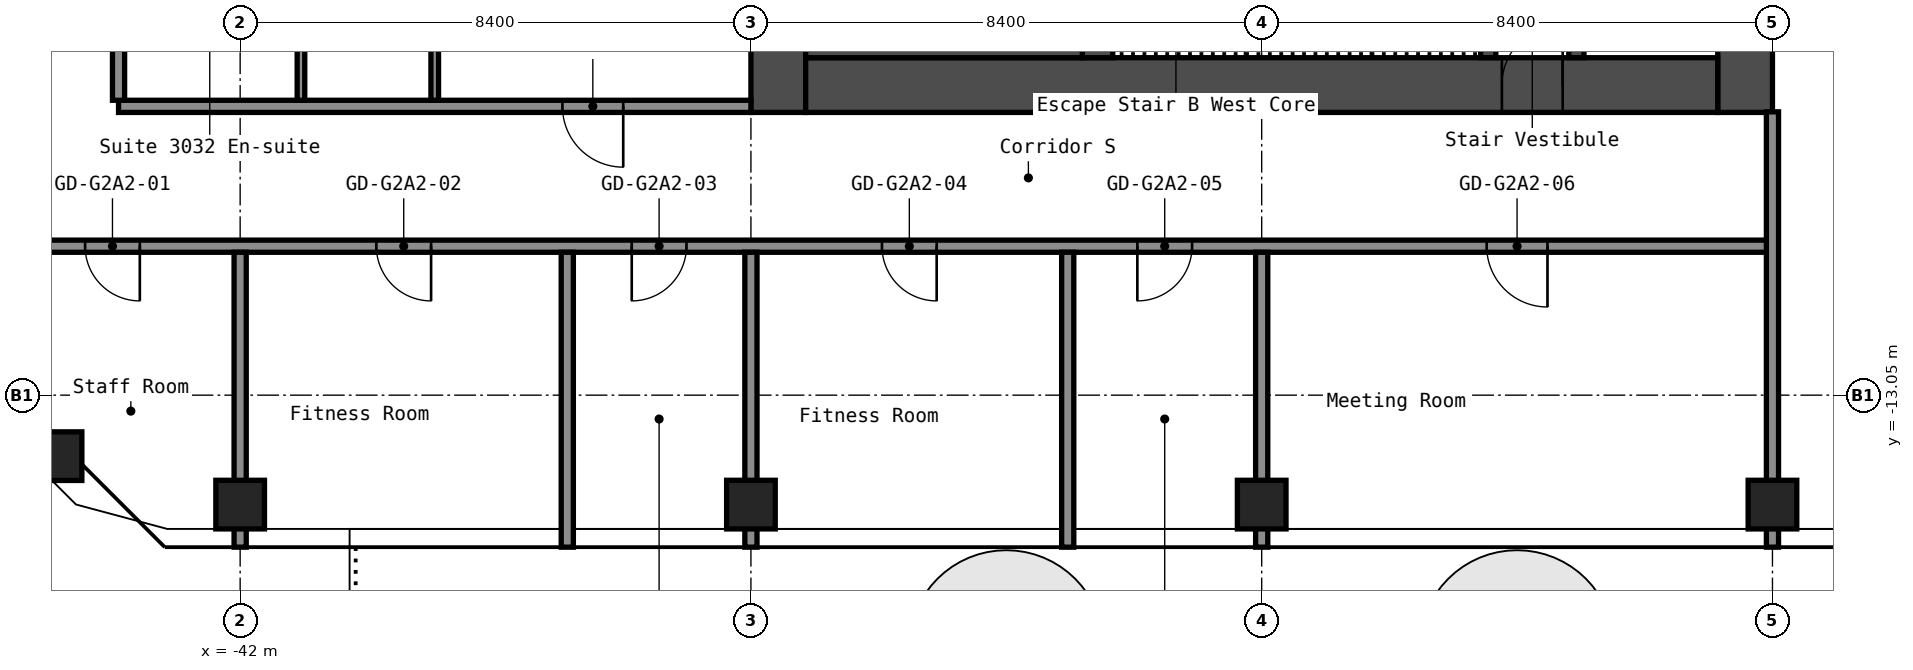
"""IFC4 building model, lengths in metres.
Left out: names, types, materials, properties, quantities, classifications, styles, units other than length and angle.
Written with IfcOpenShell. Run it as: python <this file> out.ifc"""

import sys

from ifc_helpers import new_model, si_unit, direction, frame, frame_2d, origin, origin_2d, place, context, subcontext, project, spatial, rectangle, hollow_rectangle, extrude, element, fill, save


model = new_model("IFC4")
c1 = context("Model", 3, precision=1e-05, world=origin(), true_north=direction((0.0, 1.0)))
c2 = subcontext(c1, "Body", "Model", "MODEL_VIEW")
j1 = project(units=[si_unit("LENGTHUNIT", "METRE"), si_unit("PLANEANGLEUNIT", "RADIAN")], contexts=[c1])
p1 = place(None, origin())
s1 = spatial("IfcSite", under=j1, at=p1, CompositionType="ELEMENT")
p2 = place(p1, origin())
s2 = spatial("IfcBuilding", under=s1, at=p2, CompositionType="ELEMENT")
p3 = place(p2, frame((0.0, 0.0, 107.4)))
s3 = spatial("IfcBuildingStorey", under=s2, at=p3, CompositionType="ELEMENT", Elevation=107.4)
for number, where, z_axis, x_axis in (
    (1, (-45.003, -14.053, 0.0), (0.0, 0.0, 1.0), (1.0, 0.0, 0.0)),
    (2, (-42.0, -14.85, 0.0), (0.0, 0.0, 1.0), (1.0, 0.0, 0.0)),
    (3, (-33.6, -14.85, 0.0), (0.0, 0.0, 1.0), (1.0, 0.0, 0.0)),
    (4, (-25.2, -14.85, 0.0), (0.0, 0.0, 1.0), (1.0, 0.0, 0.0)),
    (5, (-16.8, -14.85, 0.0), (0.0, 0.0, 1.0), (1.0, 0.0, 0.0)),
):
    element("IfcColumn", number, at=place(p3, frame(where, z_axis=z_axis, x_axis=x_axis)), inside=s3, PredefinedType="COLUMN", context=c2, shape_type="SweptSolid", body=[
        extrude(hollow_rectangle(XDim=0.8, YDim=0.8, WallThickness=0.032, at=origin_2d()), origin(), (0.0, 0.0, 1.0), 2.8),
    ])
p4 = place(p3, frame((-17.25, -8.4, 0.0), z_axis=(0.0, 0.0, 1.0), x_axis=(0.0, 1.0, 0.0)))
e6 = element("IfcWall", 6, at=p4, inside=s3, PredefinedType="SHEAR", context=c2, shape_type="SweptSolid", body=[
    extrude(rectangle(XDim=16.8, YDim=0.9, at=frame_2d((8.4, 0.0))), origin(), (0.0, 0.0, 1.0), 2.8),
])
p5 = place(p4, frame((7.6, 0.0, 0.0)))
e7 = element("IfcOpeningElement", 7, at=p5, cuts=e6, PredefinedType="OPENING", context=c2, shape_type="SweptSolid", body=[
    extrude(rectangle(XDim=1.2, YDim=2.1, at=frame_2d((0.6, 1.05))), frame((0.0, 0.46, 0.0), z_axis=(0.0, -1.0, 0.0), x_axis=(1.0, 0.0, 0.0)), (0.0, 0.0, 1.0), 0.92),
])
p6 = place(p3, frame((-33.15, -8.4, 0.0), z_axis=(0.0, 0.0, 1.0), x_axis=(0.0, 1.0, 0.0)))
e8 = element("IfcWall", 8, at=p6, inside=s3, PredefinedType="SHEAR", context=c2, shape_type="SweptSolid", body=[
    extrude(rectangle(XDim=16.8, YDim=0.9, at=frame_2d((8.4, 0.0))), origin(), (0.0, 0.0, 1.0), 2.8),
])
p7 = place(p3, frame((-32.7, -7.95, 0.0), z_axis=(0.0, 0.0, 1.0), x_axis=(1.0, 0.0, 0.0)))
e9 = element("IfcWall", 9, at=p7, inside=s3, PredefinedType="SHEAR", context=c2, shape_type="SweptSolid", body=[
    extrude(rectangle(XDim=15.0, YDim=0.9, at=frame_2d((7.5, 0.0))), origin(), (0.0, 0.0, 1.0), 2.8),
])
p8 = place(p7, frame((11.45, 0.0, 0.0)))
e10 = element("IfcOpeningElement", 10, at=p8, cuts=e9, PredefinedType="OPENING", context=c2, shape_type="SweptSolid", body=[
    extrude(rectangle(XDim=1.0, YDim=2.1, at=frame_2d((0.5, 1.05))), frame((0.0, 0.46, 0.0), z_axis=(0.0, -1.0, 0.0), x_axis=(1.0, 0.0, 0.0)), (0.0, 0.0, 1.0), 0.92),
])
p9 = place(p3, frame((-20.025, -7.5, 0.0), z_axis=(0.0, 0.0, 1.0), x_axis=(0.0, 1.0, 0.0)))
e11 = element("IfcWall", 11, at=p9, inside=s3, PredefinedType="SHEAR", context=c2, shape_type="SweptSolid", body=[
    extrude(rectangle(XDim=6.3, YDim=0.25, at=frame_2d((3.15, 0.0))), origin(), (0.0, 0.0, 1.0), 2.8),
])
p10 = place(p9, frame((2.4, 0.0, 0.0)))
e12 = element("IfcOpeningElement", 12, at=p10, cuts=e11, PredefinedType="OPENING", context=c2, shape_type="SweptSolid", body=[
    extrude(rectangle(XDim=1.0, YDim=2.1, at=frame_2d((0.5, 1.05))), frame((0.0, 0.135, 0.0), z_axis=(0.0, -1.0, 0.0), x_axis=(1.0, 0.0, 0.0)), (0.0, 0.0, 1.0), 0.27),
])
p11 = place(p3, frame((-21.475, -7.5, 0.0), z_axis=(0.0, 0.0, 1.0), x_axis=(0.0, 1.0, 0.0)))
e13 = element("IfcWall", 13, at=p11, inside=s3, PredefinedType="SHEAR", context=c2, shape_type="SweptSolid", body=[
    extrude(rectangle(XDim=3.75, YDim=0.25, at=frame_2d((1.875, 0.0))), origin(), (0.0, 0.0, 1.0), 2.8),
])
p12 = place(p11, frame((1.3, 0.0, 0.0)))
e14 = element("IfcOpeningElement", 14, at=p12, cuts=e13, PredefinedType="OPENING", context=c2, shape_type="SweptSolid", body=[
    extrude(rectangle(XDim=1.2, YDim=2.1, at=frame_2d((0.6, 1.05))), frame((0.0, 0.135, 0.0), z_axis=(0.0, -1.0, 0.0), x_axis=(1.0, 0.0, 0.0)), (0.0, 0.0, 1.0), 0.27),
])
p13 = place(p3, frame((-27.9, -7.5, 0.0), z_axis=(0.0, 0.0, 1.0), x_axis=(0.0, 1.0, 0.0)))
e15 = element("IfcWall", 15, at=p13, inside=s3, PredefinedType="SHEAR", context=c2, shape_type="SweptSolid", body=[
    extrude(rectangle(XDim=3.75, YDim=0.5, at=frame_2d((1.875, 0.0))), origin(), (0.0, 0.0, 1.0), 2.8),
])
p14 = place(p3, frame((-32.7, -6.75, 0.0), z_axis=(0.0, 0.0, 1.0), x_axis=(1.0, 0.0, 0.0)))
e16 = element("IfcWall", 16, at=p14, inside=s3, PredefinedType="SHEAR", context=c2, shape_type="SweptSolid", body=[
    extrude(rectangle(XDim=4.55, YDim=1.5, at=frame_2d((2.275, 0.0))), origin(), (0.0, 0.0, 1.0), 2.8),
])
p15 = place(p3, frame((-46.5, -10.6, 0.0), z_axis=(0.0, 0.0, 1.0), x_axis=(1.0, 0.0, 0.0)))
e17 = element("IfcWall", 17, at=p15, inside=s3, PredefinedType="PARTITIONING", context=c2, shape_type="SweptSolid", body=[
    extrude(rectangle(XDim=29.7, YDim=0.2, at=frame_2d((14.85, 0.0))), origin(), (0.0, 0.0, 1.0), 2.8),
])
p16 = place(p15, frame((1.95, 0.0, 0.0)))
e18 = element("IfcOpeningElement", 18, at=p16, cuts=e17, PredefinedType="OPENING", context=c2, shape_type="SweptSolid", body=[
    extrude(rectangle(XDim=0.9, YDim=2.1, at=frame_2d((0.45, 1.05))), frame((0.0, 0.11, 0.0), z_axis=(0.0, -1.0, 0.0), x_axis=(1.0, 0.0, 0.0)), (0.0, 0.0, 1.0), 0.22),
])
p17 = place(p15, frame((6.74, 0.0, 0.0)))
e19 = element("IfcOpeningElement", 19, at=p17, cuts=e17, PredefinedType="OPENING", context=c2, shape_type="SweptSolid", body=[
    extrude(rectangle(XDim=0.9, YDim=2.1, at=frame_2d((0.45, 1.05))), frame((0.0, 0.11, 0.0), z_axis=(0.0, -1.0, 0.0), x_axis=(1.0, 0.0, 0.0)), (0.0, 0.0, 1.0), 0.22),
])
p18 = place(p15, frame((10.94, 0.0, 0.0)))
e20 = element("IfcOpeningElement", 20, at=p18, cuts=e17, PredefinedType="OPENING", context=c2, shape_type="SweptSolid", body=[
    extrude(rectangle(XDim=0.9, YDim=2.1, at=frame_2d((0.45, 1.05))), frame((0.0, 0.11, 0.0), z_axis=(0.0, -1.0, 0.0), x_axis=(1.0, 0.0, 0.0)), (0.0, 0.0, 1.0), 0.22),
])
p19 = place(p15, frame((15.055, 0.0, 0.0)))
e21 = element("IfcOpeningElement", 21, at=p19, cuts=e17, PredefinedType="OPENING", context=c2, shape_type="SweptSolid", body=[
    extrude(rectangle(XDim=0.9, YDim=2.1, at=frame_2d((0.45, 1.05))), frame((0.0, 0.11, 0.0), z_axis=(0.0, -1.0, 0.0), x_axis=(1.0, 0.0, 0.0)), (0.0, 0.0, 1.0), 0.22),
])
p20 = place(p15, frame((19.255, 0.0, 0.0)))
e22 = element("IfcOpeningElement", 22, at=p20, cuts=e17, PredefinedType="OPENING", context=c2, shape_type="SweptSolid", body=[
    extrude(rectangle(XDim=0.9, YDim=2.1, at=frame_2d((0.45, 1.05))), frame((0.0, 0.11, 0.0), z_axis=(0.0, -1.0, 0.0), x_axis=(1.0, 0.0, 0.0)), (0.0, 0.0, 1.0), 0.22),
])
p21 = place(p15, frame((25.0, 0.0, 0.0)))
e23 = element("IfcOpeningElement", 23, at=p21, cuts=e17, PredefinedType="OPENING", context=c2, shape_type="SweptSolid", body=[
    extrude(rectangle(XDim=1.0, YDim=2.1, at=frame_2d((0.5, 1.05))), frame((0.0, 0.11, 0.0), z_axis=(0.0, -1.0, 0.0), x_axis=(1.0, 0.0, 0.0)), (0.0, 0.0, 1.0), 0.22),
])
p22 = place(p3, frame((-44.0, -8.3, 0.0), z_axis=(0.0, 0.0, 1.0), x_axis=(1.0, 0.0, 0.0)))
e24 = element("IfcWall", 24, at=p22, inside=s3, PredefinedType="PARTITIONING", context=c2, shape_type="SweptSolid", body=[
    extrude(rectangle(XDim=10.4, YDim=0.2, at=frame_2d((5.2, 0.0))), origin(), (0.0, 0.0, 1.0), 2.8),
])
p23 = place(p22, frame((7.3, 0.0, 0.0)))
e25 = element("IfcOpeningElement", 25, at=p23, cuts=e24, PredefinedType="OPENING", context=c2, shape_type="SweptSolid", body=[
    extrude(rectangle(XDim=1.0, YDim=2.1, at=frame_2d((0.5, 1.05))), frame((0.0, 0.11, 0.0), z_axis=(0.0, -1.0, 0.0), x_axis=(1.0, 0.0, 0.0)), (0.0, 0.0, 1.0), 0.22),
])
p24 = place(p3, frame((-44.0, -8.2, 0.0), z_axis=(0.0, 0.0, 1.0), x_axis=(0.0, 1.0, 0.0)))
e26 = element("IfcWall", 26, at=p24, inside=s3, PredefinedType="PARTITIONING", context=c2, shape_type="SweptSolid", body=[
    extrude(rectangle(XDim=16.4, YDim=0.2, at=frame_2d((8.2, 0.0))), origin(), (0.0, 0.0, 1.0), 2.8),
])
p25 = place(p3, frame((-42.0, -15.55, 0.0), z_axis=(0.0, 0.0, 1.0), x_axis=(0.0, 1.0, 0.0)))
e27 = element("IfcWall", 27, at=p25, inside=s3, PredefinedType="PARTITIONING", context=c2, shape_type="SweptSolid", body=[
    extrude(rectangle(XDim=4.85, YDim=0.2, at=frame_2d((2.425, 0.0))), origin(), (0.0, 0.0, 1.0), 2.8),
])
p26 = place(p3, frame((-41.0, -8.2, 0.0), z_axis=(0.0, 0.0, 1.0), x_axis=(0.0, 1.0, 0.0)))
e28 = element("IfcWall", 28, at=p26, inside=s3, PredefinedType="PARTITIONING", context=c2, shape_type="SweptSolid", body=[
    extrude(rectangle(XDim=3.1, YDim=0.125, at=frame_2d((1.55, 0.0))), origin(), (0.0, 0.0, 1.0), 2.8),
])
p27 = place(p3, frame((-38.8, -8.2, 0.0), z_axis=(0.0, 0.0, 1.0), x_axis=(0.0, 1.0, 0.0)))
e29 = element("IfcWall", 29, at=p27, inside=s3, PredefinedType="PARTITIONING", context=c2, shape_type="SweptSolid", body=[
    extrude(rectangle(XDim=8.1, YDim=0.125, at=frame_2d((4.05, 0.0))), origin(), (0.0, 0.0, 1.0), 2.8),
])
p28 = place(p27, frame((4.05, 0.0, 0.0)))
e30 = element("IfcOpeningElement", 30, at=p28, cuts=e29, PredefinedType="OPENING", context=c2, shape_type="SweptSolid", body=[
    extrude(rectangle(XDim=0.9, YDim=2.1, at=frame_2d((0.45, 1.05))), frame((0.0, 0.073, 0.0), z_axis=(0.0, -1.0, 0.0), x_axis=(1.0, 0.0, 0.0)), (0.0, 0.0, 1.0), 0.145),
])
for number, where, z_axis, x_axis in (
    (31, (-36.62, -15.55, 0.0), (0.0, 0.0, 1.0), (0.0, 1.0, 0.0)),
    (32, (-33.6, -15.55, 0.0), (0.0, 0.0, 1.0), (0.0, 1.0, 0.0)),
    (33, (-28.39, -15.55, 0.0), (0.0, 0.0, 1.0), (0.0, 1.0, 0.0)),
    (34, (-25.2, -15.55, 0.0), (0.0, 0.0, 1.0), (0.0, 1.0, 0.0)),
):
    element("IfcWall", number, at=place(p3, frame(where, z_axis=z_axis, x_axis=x_axis)), inside=s3, PredefinedType="PARTITIONING", context=c2, shape_type="SweptSolid", body=[
        extrude(rectangle(XDim=4.85, YDim=0.2, at=frame_2d((2.425, 0.0))), origin(), (0.0, 0.0, 1.0), 2.8),
    ])
p29 = place(p3, frame((-16.8, -15.55, 0.0), z_axis=(0.0, 0.0, 1.0), x_axis=(0.0, 1.0, 0.0)))
e35 = element("IfcWall", 35, at=p29, inside=s3, PredefinedType="PARTITIONING", context=c2, shape_type="SweptSolid", body=[
    extrude(rectangle(XDim=7.16, YDim=0.2, at=frame_2d((3.58, 0.0))), origin(), (0.0, 0.0, 1.0), 2.8),
])
p30 = place(p8, origin())
e36 = element("IfcDoor", 36, at=p30, inside=s3, OperationType="SINGLE_SWING_LEFT", PredefinedType="DOOR", context=c2, shape_type="SweptSolid", body=[
    extrude(rectangle(XDim=1.0, YDim=2.1, at=frame_2d((0.5, 1.05))), frame((0.0, 0.025, 0.0), z_axis=(0.0, -1.0, 0.0), x_axis=(1.0, 0.0, 0.0)), (0.0, 0.0, 1.0), 0.05),
])
fill(e10, e36)
p31 = place(p16, origin())
e37 = element("IfcDoor", 37, at=p31, inside=s3, OperationType="SINGLE_SWING_RIGHT", PredefinedType="DOOR", context=c2, shape_type="SweptSolid", body=[
    extrude(rectangle(XDim=0.9, YDim=2.1, at=frame_2d((0.45, 1.05))), frame((0.0, 0.025, 0.0), z_axis=(0.0, -1.0, 0.0), x_axis=(1.0, 0.0, 0.0)), (0.0, 0.0, 1.0), 0.05),
])
fill(e18, e37)
p32 = place(p17, origin())
e38 = element("IfcDoor", 38, at=p32, inside=s3, OperationType="SINGLE_SWING_RIGHT", PredefinedType="DOOR", context=c2, shape_type="SweptSolid", body=[
    extrude(rectangle(XDim=0.9, YDim=2.1, at=frame_2d((0.45, 1.05))), frame((0.0, 0.025, 0.0), z_axis=(0.0, -1.0, 0.0), x_axis=(1.0, 0.0, 0.0)), (0.0, 0.0, 1.0), 0.05),
])
fill(e19, e38)
p33 = place(p18, origin())
e39 = element("IfcDoor", 39, at=p33, inside=s3, OperationType="SINGLE_SWING_LEFT", PredefinedType="DOOR", context=c2, shape_type="SweptSolid", body=[
    extrude(rectangle(XDim=0.9, YDim=2.1, at=frame_2d((0.45, 1.05))), frame((0.0, 0.025, 0.0), z_axis=(0.0, -1.0, 0.0), x_axis=(1.0, 0.0, 0.0)), (0.0, 0.0, 1.0), 0.05),
])
fill(e20, e39)
p34 = place(p19, origin())
e40 = element("IfcDoor", 40, at=p34, inside=s3, OperationType="SINGLE_SWING_RIGHT", PredefinedType="DOOR", context=c2, shape_type="SweptSolid", body=[
    extrude(rectangle(XDim=0.9, YDim=2.1, at=frame_2d((0.45, 1.05))), frame((0.0, 0.025, 0.0), z_axis=(0.0, -1.0, 0.0), x_axis=(1.0, 0.0, 0.0)), (0.0, 0.0, 1.0), 0.05),
])
fill(e21, e40)
p35 = place(p20, origin())
e41 = element("IfcDoor", 41, at=p35, inside=s3, OperationType="SINGLE_SWING_LEFT", PredefinedType="DOOR", context=c2, shape_type="SweptSolid", body=[
    extrude(rectangle(XDim=0.9, YDim=2.1, at=frame_2d((0.45, 1.05))), frame((0.0, 0.025, 0.0), z_axis=(0.0, -1.0, 0.0), x_axis=(1.0, 0.0, 0.0)), (0.0, 0.0, 1.0), 0.05),
])
fill(e22, e41)
p36 = place(p21, origin())
e42 = element("IfcDoor", 42, at=p36, inside=s3, OperationType="SINGLE_SWING_RIGHT", PredefinedType="DOOR", context=c2, shape_type="SweptSolid", body=[
    extrude(rectangle(XDim=1.0, YDim=2.1, at=frame_2d((0.5, 1.05))), frame((0.0, 0.025, 0.0), z_axis=(0.0, -1.0, 0.0), x_axis=(1.0, 0.0, 0.0)), (0.0, 0.0, 1.0), 0.05),
])
fill(e23, e42)
p37 = place(p23, origin())
e43 = element("IfcDoor", 43, at=p37, inside=s3, OperationType="SINGLE_SWING_RIGHT", PredefinedType="DOOR", context=c2, shape_type="SweptSolid", body=[
    extrude(rectangle(XDim=1.0, YDim=2.1, at=frame_2d((0.5, 1.05))), frame((0.0, 0.025, 0.0), z_axis=(0.0, -1.0, 0.0), x_axis=(1.0, 0.0, 0.0)), (0.0, 0.0, 1.0), 0.05),
])
fill(e25, e43)
save(model, sys.argv[1])
